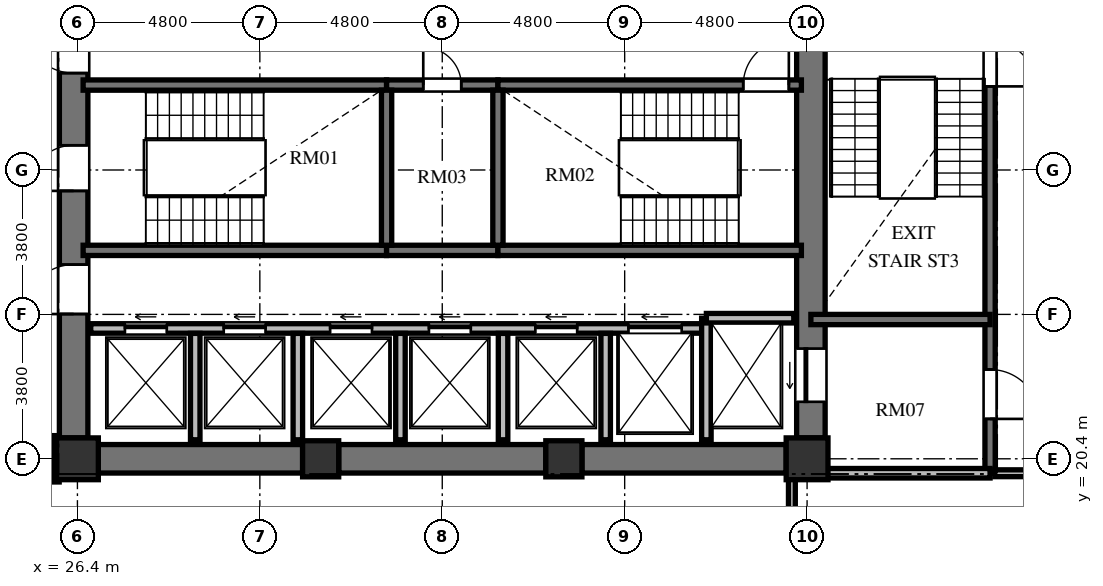
"""IFC4 building model, lengths in metres.
Left out: names, types, materials, properties, quantities, classifications, styles, units other than length and angle.
Written with IfcOpenShell. Run it as: python <this file> out.ifc"""

import sys

from ifc_helpers import new_model, si_unit, direction, frame, frame_2d, origin, origin_2d, place, context, subcontext, project, spatial, rectangle, extrude, element, fill, save


model = new_model("IFC4")
c1 = context("Model", 3, precision=1e-05, world=origin(), true_north=direction((0.0, 1.0)))
c2 = subcontext(c1, "Body", "Model", "MODEL_VIEW")
j1 = project(units=[si_unit("LENGTHUNIT", "METRE"), si_unit("PLANEANGLEUNIT", "RADIAN")], contexts=[c1])
p1 = place(None, origin())
s1 = spatial("IfcSite", under=j1, at=p1, CompositionType="ELEMENT")
p2 = place(p1, origin())
s2 = spatial("IfcBuilding", under=s1, at=p2, CompositionType="ELEMENT")
p3 = place(p2, frame((0.0, 0.0, 99.984)))
s3 = spatial("IfcBuildingStorey", under=s2, at=p3, CompositionType="ELEMENT", Elevation=99.984)
p4 = place(p3, frame((26.4, 20.4, 0.0), z_axis=(0.0, 0.0, 1.0), x_axis=(1.0, 0.0, 0.0)))
e1 = element("IfcColumn", 1, at=p4, inside=s3, PredefinedType="COLUMN", context=c2, shape_type="SweptSolid", body=[
    extrude(rectangle(XDim=1.1, YDim=1.1, at=origin_2d()), origin(), (0.0, 0.0, 1.0), 3.648),
])
for number, where, z_axis, x_axis in (
    (2, (32.8, 20.4, 0.0), (0.0, 0.0, 1.0), (1.0, 0.0, 0.0)),
    (3, (39.2, 20.4, 0.0), (0.0, 0.0, 1.0), (1.0, 0.0, 0.0)),
):
    element("IfcColumn", number, at=place(p3, frame(where, z_axis=z_axis, x_axis=x_axis)), inside=s3, PredefinedType="COLUMN", context=c2, shape_type="SweptSolid", body=[
        extrude(rectangle(XDim=0.95, YDim=0.95, at=origin_2d()), origin(), (0.0, 0.0, 1.0), 3.648),
    ])
p5 = place(p3, frame((45.6, 20.4, 0.0), z_axis=(0.0, 0.0, 1.0), x_axis=(1.0, 0.0, 0.0)))
e4 = element("IfcColumn", 4, at=p5, inside=s3, PredefinedType="COLUMN", context=c2, shape_type="SweptSolid", body=[
    extrude(rectangle(XDim=1.1, YDim=1.1, at=origin_2d()), origin(), (0.0, 0.0, 1.0), 3.648),
])
p6 = place(p3, frame((26.3, 20.95, 0.0), z_axis=(0.0, 0.0, 1.0), x_axis=(0.0, 1.0, 0.0)))
e5 = element("IfcWall", 5, at=p6, inside=s3, PredefinedType="SHEAR", context=c2, shape_type="SweptSolid", body=[
    extrude(rectangle(XDim=14.1, YDim=0.75, at=frame_2d((7.05, 0.0))), origin(), (0.0, 0.0, 1.0), 3.648),
])
p7 = place(p6, frame((6.5, 0.0, 0.0)))
e6 = element("IfcOpeningElement", 6, at=p7, cuts=e5, PredefinedType="OPENING", context=c2, shape_type="SweptSolid", body=[
    extrude(rectangle(XDim=1.2, YDim=2.15, at=frame_2d((0.6, 1.075))), frame((0.0, 0.385, 0.0), z_axis=(0.0, -1.0, 0.0), x_axis=(1.0, 0.0, 0.0)), (0.0, 0.0, 1.0), 0.77),
])
p8 = place(p6, frame((9.6, 0.0, 0.0)))
e7 = element("IfcOpeningElement", 7, at=p8, cuts=e5, PredefinedType="OPENING", context=c2, shape_type="SweptSolid", body=[
    extrude(rectangle(XDim=1.3, YDim=2.2, at=frame_2d((0.65, 1.1))), frame((0.0, 0.385, 0.0), z_axis=(0.0, -1.0, 0.0), x_axis=(1.0, 0.0, 0.0)), (0.0, 0.0, 1.0), 0.77),
])
p9 = place(p6, frame((3.26, 0.0, 0.0)))
e8 = element("IfcOpeningElement", 8, at=p9, cuts=e5, PredefinedType="OPENING", context=c2, shape_type="SweptSolid", body=[
    extrude(rectangle(XDim=1.3, YDim=2.2, at=frame_2d((0.65, 1.1))), frame((0.0, 0.385, 0.0), z_axis=(0.0, -1.0, 0.0), x_axis=(1.0, 0.0, 0.0)), (0.0, 0.0, 1.0), 0.77),
])
p10 = place(p3, frame((45.7, 20.95, 0.0), z_axis=(0.0, 0.0, 1.0), x_axis=(0.0, 1.0, 0.0)))
e9 = element("IfcWall", 9, at=p10, inside=s3, PredefinedType="SHEAR", context=c2, shape_type="SweptSolid", body=[
    extrude(rectangle(XDim=14.1, YDim=0.75, at=frame_2d((7.05, 0.0))), origin(), (0.0, 0.0, 1.0), 3.648),
])
p11 = place(p10, frame((11.75, 0.0, 0.0)))
e10 = element("IfcOpeningElement", 10, at=p11, cuts=e9, PredefinedType="OPENING", context=c2, shape_type="SweptSolid", body=[
    extrude(rectangle(XDim=1.4, YDim=2.3, at=frame_2d((0.7, 1.15))), frame((0.0, 0.385, 0.0), z_axis=(0.0, -1.0, 0.0), x_axis=(1.0, 0.0, 0.0)), (0.0, 0.0, 1.0), 0.77),
])
p12 = place(p10, frame((0.95, 0.0, 0.0)))
e11 = element("IfcOpeningElement", 11, at=p12, cuts=e9, PredefinedType="OPENING", context=c2, shape_type="SweptSolid", body=[
    extrude(rectangle(XDim=1.4, YDim=2.3, at=frame_2d((0.7, 1.15))), frame((0.0, 0.385, 0.0), z_axis=(0.0, -1.0, 0.0), x_axis=(1.0, 0.0, 0.0)), (0.0, 0.0, 1.0), 0.77),
])
p13 = place(p3, frame((26.95, 20.4, 0.0), z_axis=(0.0, 0.0, 1.0), x_axis=(1.0, 0.0, 0.0)))
e12 = element("IfcWall", 12, at=p13, inside=s3, PredefinedType="SHEAR", context=c2, shape_type="SweptSolid", body=[
    extrude(rectangle(XDim=5.375, YDim=0.75, at=frame_2d((2.688, 0.0))), origin(), (0.0, 0.0, 1.0), 3.648),
])
p14 = place(p3, frame((33.275, 20.4, 0.0), z_axis=(0.0, 0.0, 1.0), x_axis=(1.0, 0.0, 0.0)))
e13 = element("IfcWall", 13, at=p14, inside=s3, PredefinedType="SHEAR", context=c2, shape_type="SweptSolid", body=[
    extrude(rectangle(XDim=5.45, YDim=0.75, at=frame_2d((2.725, 0.0))), origin(), (0.0, 0.0, 1.0), 3.648),
])
p15 = place(p3, frame((39.675, 20.4, 0.0), z_axis=(0.0, 0.0, 1.0), x_axis=(1.0, 0.0, 0.0)))
e14 = element("IfcWall", 14, at=p15, inside=s3, PredefinedType="SHEAR", context=c2, shape_type="SweptSolid", body=[
    extrude(rectangle(XDim=5.375, YDim=0.75, at=frame_2d((2.688, 0.0))), origin(), (0.0, 0.0, 1.0), 3.648),
])
p16 = place(p3, frame((26.55, 30.235, 0.0), z_axis=(0.0, 0.0, 1.0), x_axis=(1.0, 0.0, 0.0)))
e15 = element("IfcWall", 15, at=p16, inside=s3, PredefinedType="SHEAR", context=c2, shape_type="SweptSolid", body=[
    extrude(rectangle(XDim=7.985, YDim=0.27, at=frame_2d((3.992, 0.0))), origin(), (0.0, 0.0, 1.0), 3.648),
])
p17 = place(p3, frame((34.535, 30.235, 0.0), z_axis=(0.0, 0.0, 1.0), x_axis=(1.0, 0.0, 0.0)))
e16 = element("IfcWall", 16, at=p17, inside=s3, PredefinedType="SHEAR", context=c2, shape_type="SweptSolid", body=[
    extrude(rectangle(XDim=2.93, YDim=0.27, at=frame_2d((1.465, 0.0))), origin(), (0.0, 0.0, 1.0), 3.648),
])
p18 = place(p17, frame((0.965, 0.0, 0.0)))
e17 = element("IfcOpeningElement", 17, at=p18, cuts=e16, PredefinedType="OPENING", context=c2, shape_type="SweptSolid", body=[
    extrude(rectangle(XDim=1.0, YDim=2.1, at=frame_2d((0.5, 1.05))), frame((0.0, 0.145, 0.0), z_axis=(0.0, -1.0, 0.0), x_axis=(1.0, 0.0, 0.0)), (0.0, 0.0, 1.0), 0.29),
])
p19 = place(p3, frame((37.465, 30.235, 0.0), z_axis=(0.0, 0.0, 1.0), x_axis=(1.0, 0.0, 0.0)))
e18 = element("IfcWall", 18, at=p19, inside=s3, PredefinedType="SHEAR", context=c2, shape_type="SweptSolid", body=[
    extrude(rectangle(XDim=7.985, YDim=0.27, at=frame_2d((3.992, 0.0))), origin(), (0.0, 0.0, 1.0), 3.648),
])
p20 = place(p19, frame((6.455, 0.0, 0.0)))
e19 = element("IfcOpeningElement", 19, at=p20, cuts=e18, PredefinedType="OPENING", context=c2, shape_type="SweptSolid", body=[
    extrude(rectangle(XDim=1.2, YDim=2.15, at=frame_2d((0.6, 1.075))), frame((0.0, 0.145, 0.0), z_axis=(0.0, -1.0, 0.0), x_axis=(1.0, 0.0, 0.0)), (0.0, 0.0, 1.0), 0.29),
])
p21 = place(p3, frame((26.55, 25.885, 0.0), z_axis=(0.0, 0.0, 1.0), x_axis=(1.0, 0.0, 0.0)))
e20 = element("IfcWall", 20, at=p21, inside=s3, PredefinedType="SHEAR", context=c2, shape_type="SweptSolid", body=[
    extrude(rectangle(XDim=7.985, YDim=0.27, at=frame_2d((3.992, 0.0))), origin(), (0.0, 0.0, 1.0), 3.648),
])
p22 = place(p3, frame((34.535, 25.885, 0.0), z_axis=(0.0, 0.0, 1.0), x_axis=(1.0, 0.0, 0.0)))
e21 = element("IfcWall", 21, at=p22, inside=s3, PredefinedType="SHEAR", context=c2, shape_type="SweptSolid", body=[
    extrude(rectangle(XDim=2.93, YDim=0.27, at=frame_2d((1.465, 0.0))), origin(), (0.0, 0.0, 1.0), 3.648),
])
p23 = place(p3, frame((37.465, 25.885, 0.0), z_axis=(0.0, 0.0, 1.0), x_axis=(1.0, 0.0, 0.0)))
e22 = element("IfcWall", 22, at=p23, inside=s3, PredefinedType="SHEAR", context=c2, shape_type="SweptSolid", body=[
    extrude(rectangle(XDim=7.985, YDim=0.27, at=frame_2d((3.992, 0.0))), origin(), (0.0, 0.0, 1.0), 3.648),
])
for number, where, z_axis, x_axis in (
    (23, (34.535, 26.02, 0.0), (0.0, 0.0, 1.0), (0.0, 1.0, 0.0)),
    (24, (37.465, 26.02, 0.0), (0.0, 0.0, 1.0), (0.0, 1.0, 0.0)),
):
    element("IfcWall", number, at=place(p3, frame(where, z_axis=z_axis, x_axis=x_axis)), inside=s3, PredefinedType="SHEAR", context=c2, shape_type="SweptSolid", body=[
        extrude(rectangle(XDim=4.08, YDim=0.27, at=frame_2d((2.04, 0.0))), origin(), (0.0, 0.0, 1.0), 3.648),
    ])
p24 = place(p3, frame((26.75, 23.83, 0.0), z_axis=(0.0, 0.0, 1.0), x_axis=(1.0, 0.0, 0.0)))
e25 = element("IfcWall", 25, at=p24, inside=s3, PredefinedType="SOLIDWALL", context=c2, shape_type="SweptSolid", body=[
    extrude(rectangle(XDim=16.2, YDim=0.25, at=frame_2d((8.1, 0.0))), origin(), (0.0, 0.0, 1.0), 3.428),
])
p25 = place(p24, frame((0.9, 0.0, 0.0)))
e26 = element("IfcOpeningElement", 26, at=p25, cuts=e25, PredefinedType="OPENING", context=c2, shape_type="SweptSolid", body=[
    extrude(rectangle(XDim=1.1, YDim=2.2, at=frame_2d((0.55, 1.1))), frame((0.0, 0.135, 0.0), z_axis=(0.0, -1.0, 0.0), x_axis=(1.0, 0.0, 0.0)), (0.0, 0.0, 1.0), 0.27),
])
p26 = place(p24, frame((3.5, 0.0, 0.0)))
e27 = element("IfcOpeningElement", 27, at=p26, cuts=e25, PredefinedType="OPENING", context=c2, shape_type="SweptSolid", body=[
    extrude(rectangle(XDim=1.1, YDim=2.2, at=frame_2d((0.55, 1.1))), frame((0.0, 0.135, 0.0), z_axis=(0.0, -1.0, 0.0), x_axis=(1.0, 0.0, 0.0)), (0.0, 0.0, 1.0), 0.27),
])
p27 = place(p24, frame((6.3, 0.0, 0.0)))
e28 = element("IfcOpeningElement", 28, at=p27, cuts=e25, PredefinedType="OPENING", context=c2, shape_type="SweptSolid", body=[
    extrude(rectangle(XDim=1.1, YDim=2.2, at=frame_2d((0.55, 1.1))), frame((0.0, 0.135, 0.0), z_axis=(0.0, -1.0, 0.0), x_axis=(1.0, 0.0, 0.0)), (0.0, 0.0, 1.0), 0.27),
])
p28 = place(p24, frame((8.9, 0.0, 0.0)))
e29 = element("IfcOpeningElement", 29, at=p28, cuts=e25, PredefinedType="OPENING", context=c2, shape_type="SweptSolid", body=[
    extrude(rectangle(XDim=1.1, YDim=2.2, at=frame_2d((0.55, 1.1))), frame((0.0, 0.135, 0.0), z_axis=(0.0, -1.0, 0.0), x_axis=(1.0, 0.0, 0.0)), (0.0, 0.0, 1.0), 0.27),
])
p29 = place(p24, frame((11.7, 0.0, 0.0)))
e30 = element("IfcOpeningElement", 30, at=p29, cuts=e25, PredefinedType="OPENING", context=c2, shape_type="SweptSolid", body=[
    extrude(rectangle(XDim=1.1, YDim=2.2, at=frame_2d((0.55, 1.1))), frame((0.0, 0.135, 0.0), z_axis=(0.0, -1.0, 0.0), x_axis=(1.0, 0.0, 0.0)), (0.0, 0.0, 1.0), 0.27),
])
p30 = place(p24, frame((14.15, 0.0, 0.0)))
e31 = element("IfcOpeningElement", 31, at=p30, cuts=e25, PredefinedType="OPENING", context=c2, shape_type="SweptSolid", body=[
    extrude(rectangle(XDim=1.4, YDim=2.3, at=frame_2d((0.7, 1.15))), frame((0.0, 0.135, 0.0), z_axis=(0.0, -1.0, 0.0), x_axis=(1.0, 0.0, 0.0)), (0.0, 0.0, 1.0), 0.27),
])
p31 = place(p3, frame((42.95, 20.9, 0.0), z_axis=(0.0, 0.0, 1.0), x_axis=(0.0, 1.0, 0.0)))
e32 = element("IfcWall", 32, at=p31, inside=s3, PredefinedType="SOLIDWALL", context=c2, shape_type="SweptSolid", body=[
    extrude(rectangle(XDim=3.2, YDim=0.25, at=frame_2d((1.6, 0.0))), origin(), (0.0, 0.0, 1.0), 3.428),
])
p32 = place(p3, frame((42.95, 24.1, 0.0), z_axis=(0.0, 0.0, 1.0), x_axis=(1.0, 0.0, 0.0)))
e33 = element("IfcWall", 33, at=p32, inside=s3, PredefinedType="SOLIDWALL", context=c2, shape_type="SweptSolid", body=[
    extrude(rectangle(XDim=2.3, YDim=0.25, at=frame_2d((1.15, 0.0))), origin(), (0.0, 0.0, 1.0), 3.428),
])
for number, where, z_axis, x_axis in (
    (34, (29.5, 20.9, 0.0), (0.0, 0.0, 1.0), (0.0, 1.0, 0.0)),
    (35, (32.2, 20.9, 0.0), (0.0, 0.0, 1.0), (0.0, 1.0, 0.0)),
    (36, (34.9, 20.9, 0.0), (0.0, 0.0, 1.0), (0.0, 1.0, 0.0)),
    (37, (37.6, 20.9, 0.0), (0.0, 0.0, 1.0), (0.0, 1.0, 0.0)),
    (38, (40.3, 20.9, 0.0), (0.0, 0.0, 1.0), (0.0, 1.0, 0.0)),
):
    element("IfcWall", number, at=place(p3, frame(where, z_axis=z_axis, x_axis=x_axis)), inside=s3, PredefinedType="SOLIDWALL", context=c2, shape_type="SweptSolid", body=[
        extrude(rectangle(XDim=2.8, YDim=0.25, at=frame_2d((1.4, 0.0))), origin(), (0.0, 0.0, 1.0), 3.428),
    ])
p33 = place(p3, frame((50.415, 35.845, 0.0), z_axis=(0.0, 0.0, 1.0), x_axis=(0.0, -1.0, 0.0)))
e39 = element("IfcWall", 39, at=p33, inside=s3, PredefinedType="SHEAR", context=c2, shape_type="SweptSolid", body=[
    extrude(rectangle(XDim=15.825, YDim=0.27, at=frame_2d((7.913, 0.0))), origin(), (0.0, 0.0, 1.0), 3.648),
])
p34 = place(p33, frame((4.445, 0.0, 0.0)))
e40 = element("IfcOpeningElement", 40, at=p34, cuts=e39, PredefinedType="OPENING", context=c2, shape_type="SweptSolid", body=[
    extrude(rectangle(XDim=1.2, YDim=2.15, at=frame_2d((0.6, 1.075))), frame((0.0, 0.145, 0.0), z_axis=(0.0, -1.0, 0.0), x_axis=(1.0, 0.0, 0.0)), (0.0, 0.0, 1.0), 0.29),
])
p35 = place(p33, frame((1.295, 0.0, 0.0)))
e41 = element("IfcOpeningElement", 41, at=p35, cuts=e39, PredefinedType="OPENING", context=c2, shape_type="SweptSolid", body=[
    extrude(rectangle(XDim=1.3, YDim=2.2, at=frame_2d((0.65, 1.1))), frame((0.0, 0.145, 0.0), z_axis=(0.0, -1.0, 0.0), x_axis=(1.0, 0.0, 0.0)), (0.0, 0.0, 1.0), 0.29),
])
p36 = place(p33, frame((13.095, 0.0, 0.0)))
e42 = element("IfcOpeningElement", 42, at=p36, cuts=e39, PredefinedType="OPENING", context=c2, shape_type="SweptSolid", body=[
    extrude(rectangle(XDim=1.3, YDim=2.2, at=frame_2d((0.65, 1.1))), frame((0.0, 0.145, 0.0), z_axis=(0.0, -1.0, 0.0), x_axis=(1.0, 0.0, 0.0)), (0.0, 0.0, 1.0), 0.29),
])
p37 = place(p3, frame((45.7, 24.065, 0.0), z_axis=(0.0, 0.0, 1.0), x_axis=(1.0, 0.0, 0.0)))
e43 = element("IfcWall", 43, at=p37, inside=s3, PredefinedType="SHEAR", context=c2, shape_type="SweptSolid", body=[
    extrude(rectangle(XDim=4.715, YDim=0.27, at=frame_2d((2.357, 0.0))), origin(), (0.0, 0.0, 1.0), 3.648),
])
p38 = place(p3, frame((45.7, 20.02, 0.0), z_axis=(0.0, 0.0, 1.0), x_axis=(1.0, 0.0, 0.0)))
e44 = element("IfcWall", 44, at=p38, inside=s3, PredefinedType="SOLIDWALL", context=c2, shape_type="SweptSolid", body=[
    extrude(rectangle(XDim=4.715, YDim=0.25, at=frame_2d((2.357, 0.0))), origin(), (0.0, 0.0, 1.0), 3.428),
])
p39 = place(p3, frame((53.19, 20.02, 0.0), z_axis=(0.0, 0.0, 1.0), x_axis=(-1.0, 0.0, 0.0)))
e45 = element("IfcWall", 45, at=p39, inside=s3, PredefinedType="PARTITIONING", context=c2, shape_type="SweptSolid", body=[
    extrude(rectangle(XDim=2.65, YDim=0.18, at=frame_2d((1.325, 0.0))), origin(), (0.0, 0.0, 1.0), 3.428),
])
p40 = place(p3, frame((25.83, 21.01, 0.0), z_axis=(0.0, 0.0, 1.0), x_axis=(0.0, -1.0, 0.0)))
e46 = element("IfcWall", 46, at=p40, inside=s3, PredefinedType="PARTITIONING", context=c2, shape_type="SweptSolid", body=[
    extrude(rectangle(XDim=1.22, YDim=0.18, at=frame_2d((0.61, 0.0))), origin(), (0.0, 0.0, 1.0), 3.428),
])
p41 = place(p3, frame((45.2, 19.91, 0.0), z_axis=(0.0, 0.0, 1.0), x_axis=(0.0, -1.0, 0.0)))
e47 = element("IfcWall", 47, at=p41, inside=s3, PredefinedType="PARTITIONING", context=c2, shape_type="SweptSolid", body=[
    extrude(rectangle(XDim=2.55, YDim=0.18, at=frame_2d((1.275, 0.0))), origin(), (0.0, 0.0, 1.0), 3.428),
])
p42 = place(p7, origin())
e48 = element("IfcDoor", 48, at=p42, inside=s3, OperationType="SINGLE_SWING_LEFT", PredefinedType="DOOR", context=c2, shape_type="SweptSolid", body=[
    extrude(rectangle(XDim=1.2, YDim=2.15, at=frame_2d((0.6, 1.075))), frame((0.0, 0.025, 0.0), z_axis=(0.0, -1.0, 0.0), x_axis=(1.0, 0.0, 0.0)), (0.0, 0.0, 1.0), 0.05),
])
fill(e6, e48)
p43 = place(p20, origin())
e49 = element("IfcDoor", 49, at=p43, inside=s3, OperationType="SINGLE_SWING_RIGHT", PredefinedType="DOOR", context=c2, shape_type="SweptSolid", body=[
    extrude(rectangle(XDim=1.2, YDim=2.15, at=frame_2d((0.6, 1.075))), frame((0.0, 0.025, 0.0), z_axis=(0.0, -1.0, 0.0), x_axis=(1.0, 0.0, 0.0)), (0.0, 0.0, 1.0), 0.05),
])
fill(e19, e49)
p44 = place(p18, origin())
e50 = element("IfcDoor", 50, at=p44, inside=s3, OperationType="SINGLE_SWING_LEFT", PredefinedType="DOOR", context=c2, shape_type="SweptSolid", body=[
    extrude(rectangle(XDim=1.0, YDim=2.1, at=frame_2d((0.5, 1.05))), frame((0.0, 0.025, 0.0), z_axis=(0.0, -1.0, 0.0), x_axis=(1.0, 0.0, 0.0)), (0.0, 0.0, 1.0), 0.05),
])
fill(e17, e50)
p45 = place(p8, origin())
e51 = element("IfcDoor", 51, at=p45, inside=s3, OperationType="SINGLE_SWING_RIGHT", PredefinedType="DOOR", context=c2, shape_type="SweptSolid", body=[
    extrude(rectangle(XDim=1.3, YDim=2.2, at=frame_2d((0.65, 1.1))), frame((0.0, 0.025, 0.0), z_axis=(0.0, -1.0, 0.0), x_axis=(1.0, 0.0, 0.0)), (0.0, 0.0, 1.0), 0.05),
])
fill(e7, e51)
p46 = place(p9, origin())
e52 = element("IfcDoor", 52, at=p46, inside=s3, OperationType="SINGLE_SWING_LEFT", PredefinedType="DOOR", context=c2, shape_type="SweptSolid", body=[
    extrude(rectangle(XDim=1.3, YDim=2.2, at=frame_2d((0.65, 1.1))), frame((0.0, 0.025, 0.0), z_axis=(0.0, -1.0, 0.0), x_axis=(1.0, 0.0, 0.0)), (0.0, 0.0, 1.0), 0.05),
])
fill(e8, e52)
p47 = place(p25, origin())
e53 = element("IfcDoor", 53, at=p47, inside=s3, OperationType="SLIDING_TO_LEFT", PredefinedType="DOOR", context=c2, shape_type="SweptSolid", body=[
    extrude(rectangle(XDim=1.1, YDim=2.2, at=frame_2d((0.55, 1.1))), frame((0.0, 0.025, 0.0), z_axis=(0.0, -1.0, 0.0), x_axis=(1.0, 0.0, 0.0)), (0.0, 0.0, 1.0), 0.05),
])
fill(e26, e53)
p48 = place(p26, origin())
e54 = element("IfcDoor", 54, at=p48, inside=s3, OperationType="SLIDING_TO_LEFT", PredefinedType="DOOR", context=c2, shape_type="SweptSolid", body=[
    extrude(rectangle(XDim=1.1, YDim=2.2, at=frame_2d((0.55, 1.1))), frame((0.0, 0.025, 0.0), z_axis=(0.0, -1.0, 0.0), x_axis=(1.0, 0.0, 0.0)), (0.0, 0.0, 1.0), 0.05),
])
fill(e27, e54)
p49 = place(p27, origin())
e55 = element("IfcDoor", 55, at=p49, inside=s3, OperationType="SLIDING_TO_LEFT", PredefinedType="DOOR", context=c2, shape_type="SweptSolid", body=[
    extrude(rectangle(XDim=1.1, YDim=2.2, at=frame_2d((0.55, 1.1))), frame((0.0, 0.025, 0.0), z_axis=(0.0, -1.0, 0.0), x_axis=(1.0, 0.0, 0.0)), (0.0, 0.0, 1.0), 0.05),
])
fill(e28, e55)
p50 = place(p28, origin())
e56 = element("IfcDoor", 56, at=p50, inside=s3, OperationType="SLIDING_TO_LEFT", PredefinedType="DOOR", context=c2, shape_type="SweptSolid", body=[
    extrude(rectangle(XDim=1.1, YDim=2.2, at=frame_2d((0.55, 1.1))), frame((0.0, 0.025, 0.0), z_axis=(0.0, -1.0, 0.0), x_axis=(1.0, 0.0, 0.0)), (0.0, 0.0, 1.0), 0.05),
])
fill(e29, e56)
p51 = place(p29, origin())
e57 = element("IfcDoor", 57, at=p51, inside=s3, OperationType="SLIDING_TO_LEFT", PredefinedType="DOOR", context=c2, shape_type="SweptSolid", body=[
    extrude(rectangle(XDim=1.1, YDim=2.2, at=frame_2d((0.55, 1.1))), frame((0.0, 0.025, 0.0), z_axis=(0.0, -1.0, 0.0), x_axis=(1.0, 0.0, 0.0)), (0.0, 0.0, 1.0), 0.05),
])
fill(e30, e57)
p52 = place(p12, origin())
e58 = element("IfcDoor", 58, at=p52, inside=s3, OperationType="SLIDING_TO_LEFT", PredefinedType="DOOR", context=c2, shape_type="SweptSolid", body=[
    extrude(rectangle(XDim=1.4, YDim=2.3, at=frame_2d((0.7, 1.15))), frame((0.0, 0.025, 0.0), z_axis=(0.0, -1.0, 0.0), x_axis=(1.0, 0.0, 0.0)), (0.0, 0.0, 1.0), 0.05),
])
fill(e11, e58)
p53 = place(p30, origin())
e59 = element("IfcDoor", 59, at=p53, inside=s3, OperationType="SLIDING_TO_LEFT", PredefinedType="DOOR", context=c2, shape_type="SweptSolid", body=[
    extrude(rectangle(XDim=1.4, YDim=2.3, at=frame_2d((0.7, 1.15))), frame((0.0, 0.025, 0.0), z_axis=(0.0, -1.0, 0.0), x_axis=(1.0, 0.0, 0.0)), (0.0, 0.0, 1.0), 0.05),
])
fill(e31, e59)
p54 = place(p34, origin())
e60 = element("IfcDoor", 60, at=p54, inside=s3, OperationType="SINGLE_SWING_RIGHT", PredefinedType="DOOR", context=c2, shape_type="SweptSolid", body=[
    extrude(rectangle(XDim=1.2, YDim=2.15, at=frame_2d((0.6, 1.075))), frame((0.0, 0.025, 0.0), z_axis=(0.0, -1.0, 0.0), x_axis=(1.0, 0.0, 0.0)), (0.0, 0.0, 1.0), 0.05),
])
fill(e40, e60)
p55 = place(p36, origin())
e61 = element("IfcDoor", 61, at=p55, inside=s3, OperationType="SINGLE_SWING_RIGHT", PredefinedType="DOOR", context=c2, shape_type="SweptSolid", body=[
    extrude(rectangle(XDim=1.3, YDim=2.2, at=frame_2d((0.65, 1.1))), frame((0.0, 0.025, 0.0), z_axis=(0.0, -1.0, 0.0), x_axis=(1.0, 0.0, 0.0)), (0.0, 0.0, 1.0), 0.05),
])
fill(e42, e61)
save(model, sys.argv[1])
